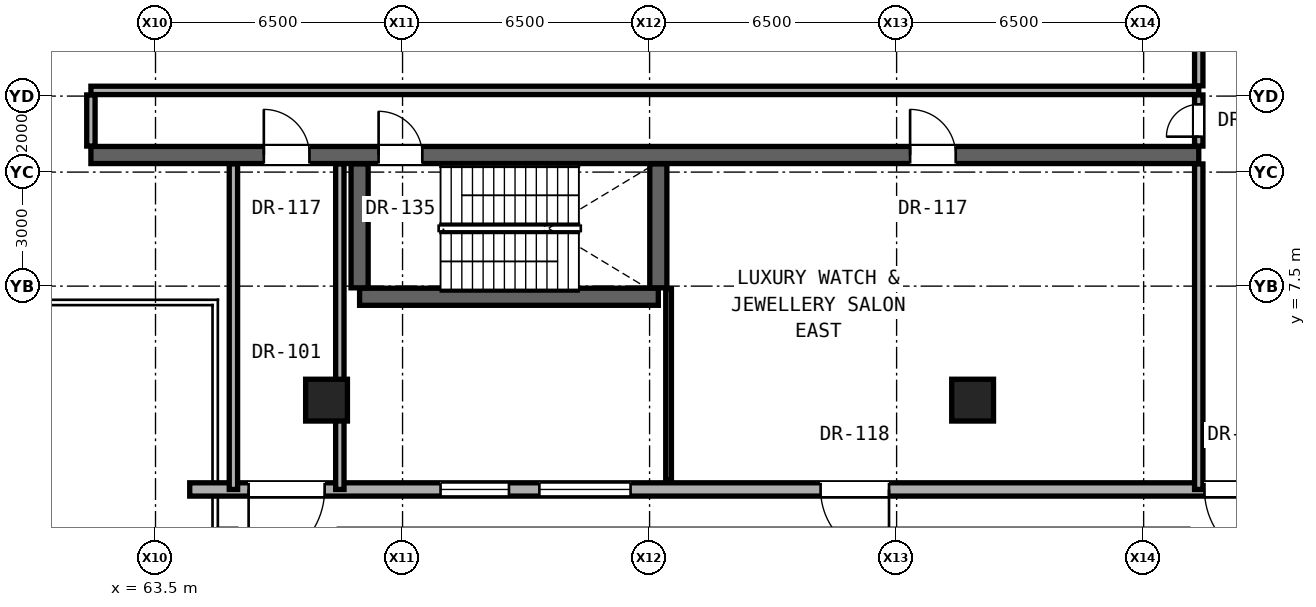
"""IFC4 building model, lengths in metres.
Left out: names, types, materials, properties, quantities, classifications, styles, units other than length and angle.
Written with IfcOpenShell. Run it as: python <this file> out.ifc"""

import sys

from ifc_helpers import new_model, si_unit, direction, frame, frame_2d, origin, origin_2d, place, context, subcontext, project, spatial, rectangle, extrude, element, fill, save


model = new_model("IFC4")
c1 = context("Model", 3, precision=1e-05, world=origin(), true_north=direction((0.0, 1.0)))
c2 = subcontext(c1, "Body", "Model", "MODEL_VIEW")
j1 = project(units=[si_unit("LENGTHUNIT", "METRE"), si_unit("PLANEANGLEUNIT", "RADIAN")], contexts=[c1])
p1 = place(None, origin())
s1 = spatial("IfcSite", under=j1, at=p1, CompositionType="ELEMENT")
p2 = place(p1, origin())
s2 = spatial("IfcBuilding", under=s1, at=p2, CompositionType="ELEMENT")
p3 = place(p2, origin())
s3 = spatial("IfcBuildingStorey", under=s2, at=p3, CompositionType="ELEMENT", Elevation=0.0)
for number, where, z_axis, x_axis in (
    (1, (68.0, 4.5, 0.0), (0.0, 0.0, 1.0), (1.0, 0.0, 0.0)),
    (2, (85.0, 4.5, 0.0), (0.0, 0.0, 1.0), (1.0, 0.0, 0.0)),
):
    element("IfcColumn", number, at=place(p3, frame(where, z_axis=z_axis, x_axis=x_axis)), inside=s3, PredefinedType="COLUMN", context=c2, shape_type="SweptSolid", body=[
        extrude(rectangle(XDim=1.1, YDim=1.1, at=origin_2d()), origin(), (0.0, 0.0, 1.0), 5.2),
    ])
p4 = place(p3, frame((93.8, 2.15, 0.0), z_axis=(0.0, 0.0, 1.0), x_axis=(-1.0, 0.0, 0.0)))
e3 = element("IfcWall", 3, at=p4, inside=s3, PredefinedType="SOLIDWALL", context=c2, shape_type="SweptSolid", body=[
    extrude(rectangle(XDim=29.4, YDim=0.35, at=frame_2d((14.7, 0.0))), origin(), (0.0, 0.0, 1.0), 4.86),
])
p5 = place(p4, frame((17.8, 0.0, 0.85)))
e4 = element("IfcOpeningElement", 4, at=p5, cuts=e3, PredefinedType="OPENING", context=c2, shape_type="SweptSolid", body=[
    extrude(rectangle(XDim=2.4, YDim=2.6, at=frame_2d((1.2, 1.3))), frame((0.0, 0.185, 0.0), z_axis=(0.0, -1.0, 0.0), x_axis=(1.0, 0.0, 0.0)), (0.0, 0.0, 1.0), 0.37),
])
p6 = place(p4, frame((21.0, 0.0, 0.85)))
e5 = element("IfcOpeningElement", 5, at=p6, cuts=e3, PredefinedType="OPENING", context=c2, shape_type="SweptSolid", body=[
    extrude(rectangle(XDim=1.8, YDim=2.4, at=frame_2d((0.9, 1.2))), frame((0.0, 0.185, 0.0), z_axis=(0.0, -1.0, 0.0), x_axis=(1.0, 0.0, 0.0)), (0.0, 0.0, 1.0), 0.37),
])
p7 = place(p4, frame((0.7, 0.0, 0.0)))
e6 = element("IfcOpeningElement", 6, at=p7, cuts=e3, PredefinedType="OPENING", context=c2, shape_type="SweptSolid", body=[
    extrude(rectangle(XDim=2.0, YDim=2.4, at=frame_2d((1.0, 1.2))), frame((0.0, 0.185, 0.0), z_axis=(0.0, -1.0, 0.0), x_axis=(1.0, 0.0, 0.0)), (0.0, 0.0, 1.0), 0.37),
])
p8 = place(p4, frame((11.0, 0.0, 0.0)))
e7 = element("IfcOpeningElement", 7, at=p8, cuts=e3, PredefinedType="OPENING", context=c2, shape_type="SweptSolid", body=[
    extrude(rectangle(XDim=1.8, YDim=2.5, at=frame_2d((0.9, 1.25))), frame((0.0, 0.185, 0.0), z_axis=(0.0, -1.0, 0.0), x_axis=(1.0, 0.0, 0.0)), (0.0, 0.0, 1.0), 0.37),
])
p9 = place(p4, frame((25.85, 0.0, 0.0)))
e8 = element("IfcOpeningElement", 8, at=p9, cuts=e3, PredefinedType="OPENING", context=c2, shape_type="SweptSolid", body=[
    extrude(rectangle(XDim=2.0, YDim=2.4, at=frame_2d((1.0, 1.2))), frame((0.0, 0.185, 0.0), z_axis=(0.0, -1.0, 0.0), x_axis=(1.0, 0.0, 0.0)), (0.0, 0.0, 1.0), 0.37),
])
p10 = place(p3, frame((68.87, 7.22, 0.0), z_axis=(0.0, 0.0, 1.0), x_axis=(1.0, 0.0, 0.0)))
e9 = element("IfcWall", 9, at=p10, inside=s3, PredefinedType="SHEAR", context=c2, shape_type="SweptSolid", body=[
    extrude(rectangle(XDim=7.86, YDim=0.45, at=frame_2d((3.93, 0.0))), origin(), (0.0, 0.0, 1.0), 4.88),
])
p11 = place(p3, frame((61.8, 10.95, 0.0), z_axis=(0.0, 0.0, 1.0), x_axis=(1.0, 0.0, 0.0)))
e10 = element("IfcWall", 10, at=p11, inside=s3, PredefinedType="SHEAR", context=c2, shape_type="SweptSolid", body=[
    extrude(rectangle(XDim=29.15, YDim=0.45, at=frame_2d((14.575, 0.0))), origin(), (0.0, 0.0, 1.0), 4.88),
])
p12 = place(p11, frame((4.55, 0.0, 0.0)))
e11 = element("IfcOpeningElement", 11, at=p12, cuts=e10, PredefinedType="OPENING", context=c2, shape_type="SweptSolid", body=[
    extrude(rectangle(XDim=1.2, YDim=2.25, at=frame_2d((0.6, 1.125))), frame((0.0, 0.235, 0.0), z_axis=(0.0, -1.0, 0.0), x_axis=(1.0, 0.0, 0.0)), (0.0, 0.0, 1.0), 0.47),
])
p13 = place(p11, frame((7.57, 0.0, 0.0)))
e12 = element("IfcOpeningElement", 12, at=p13, cuts=e10, PredefinedType="OPENING", context=c2, shape_type="SweptSolid", body=[
    extrude(rectangle(XDim=1.15, YDim=2.2, at=frame_2d((0.575, 1.1))), frame((0.0, 0.235, 0.0), z_axis=(0.0, -1.0, 0.0), x_axis=(1.0, 0.0, 0.0)), (0.0, 0.0, 1.0), 0.47),
])
p14 = place(p11, frame((21.555, 0.0, 0.0)))
e13 = element("IfcOpeningElement", 13, at=p14, cuts=e10, PredefinedType="OPENING", context=c2, shape_type="SweptSolid", body=[
    extrude(rectangle(XDim=1.2, YDim=2.25, at=frame_2d((0.6, 1.125))), frame((0.0, 0.235, 0.0), z_axis=(0.0, -1.0, 0.0), x_axis=(1.0, 0.0, 0.0)), (0.0, 0.0, 1.0), 0.47),
])
p15 = place(p3, frame((61.8, 12.65, 0.0), z_axis=(0.0, 0.0, 1.0), x_axis=(1.0, 0.0, 0.0)))
e14 = element("IfcWall", 14, at=p15, inside=s3, PredefinedType="SOLIDWALL", context=c2, shape_type="SweptSolid", body=[
    extrude(rectangle(XDim=29.15, YDim=0.22, at=frame_2d((14.575, 0.0))), origin(), (0.0, 0.0, 1.0), 4.016),
])
p16 = place(p3, frame((61.8, 11.185, 0.0), z_axis=(0.0, 0.0, 1.0), x_axis=(0.0, 1.0, 0.0)))
e15 = element("IfcWall", 15, at=p16, inside=s3, PredefinedType="SOLIDWALL", context=c2, shape_type="SweptSolid", body=[
    extrude(rectangle(XDim=1.345, YDim=0.22, at=frame_2d((0.672, 0.0))), origin(), (0.0, 0.0, 1.0), 4.88),
])
p17 = place(p3, frame((65.55, 2.15, 0.0), z_axis=(0.0, 0.0, 1.0), x_axis=(0.0, 1.0, 0.0)))
e16 = element("IfcWall", 16, at=p17, inside=s3, PredefinedType="SOLIDWALL", context=c2, shape_type="SweptSolid", body=[
    extrude(rectangle(XDim=8.565, YDim=0.22, at=frame_2d((4.283, 0.0))), origin(), (0.0, 0.0, 1.0), 4.099),
])
p18 = place(p3, frame((68.35, 2.15, 0.0), z_axis=(0.0, 0.0, 1.0), x_axis=(0.0, 1.0, 0.0)))
e17 = element("IfcWall", 17, at=p18, inside=s3, PredefinedType="SOLIDWALL", context=c2, shape_type="SweptSolid", body=[
    extrude(rectangle(XDim=8.565, YDim=0.22, at=frame_2d((4.283, 0.0))), origin(), (0.0, 0.0, 1.0), 4.016),
])
for number, where, z_axis, x_axis in (
    (18, (68.87, 7.455, 0.0), (0.0, 0.0, 1.0), (0.0, 1.0, 0.0)),
    (19, (76.73, 7.455, 0.0), (0.0, 0.0, 1.0), (0.0, 1.0, 0.0)),
):
    element("IfcWall", number, at=place(p3, frame(where, z_axis=z_axis, x_axis=x_axis)), inside=s3, PredefinedType="SHEAR", context=c2, shape_type="SweptSolid", body=[
        extrude(rectangle(XDim=3.26, YDim=0.45, at=frame_2d((1.63, 0.0))), origin(), (0.0, 0.0, 1.0), 4.88),
    ])
p19 = place(p3, frame((77.0, 2.4, 0.0), z_axis=(0.0, 0.0, 1.0), x_axis=(0.0, 1.0, 0.0)))
e20 = element("IfcWall", 20, at=p19, inside=s3, PredefinedType="PARTITIONING", context=c2, shape_type="SweptSolid", body=[
    extrude(rectangle(XDim=5.035, YDim=0.15, at=frame_2d((2.518, 0.0))), origin(), (0.0, 0.0, 1.0), 4.016),
])
p20 = place(p3, frame((90.95, 2.15, 0.0), z_axis=(0.0, 0.0, 1.0), x_axis=(0.0, 1.0, 0.0)))
e21 = element("IfcWall", 21, at=p20, inside=s3, PredefinedType="SOLIDWALL", context=c2, shape_type="SweptSolid", body=[
    extrude(rectangle(XDim=8.565, YDim=0.22, at=frame_2d((4.283, 0.0))), origin(), (0.0, 0.0, 1.0), 4.88),
])
p21 = place(p3, frame((90.95, 11.185, 0.0), z_axis=(0.0, 0.0, 1.0), x_axis=(0.0, 1.0, 0.0)))
e22 = element("IfcWall", 22, at=p21, inside=s3, PredefinedType="SOLIDWALL", context=c2, shape_type="SweptSolid", body=[
    extrude(rectangle(XDim=1.345, YDim=0.22, at=frame_2d((0.672, 0.0))), origin(), (0.0, 0.0, 1.0), 4.88),
])
p22 = place(p21, frame((0.248, 0.0, 0.0)))
e23 = element("IfcOpeningElement", 23, at=p22, cuts=e22, PredefinedType="OPENING", context=c2, shape_type="SweptSolid", body=[
    extrude(rectangle(XDim=0.85, YDim=2.01, at=frame_2d((0.425, 1.005))), frame((0.0, 0.12, 0.0), z_axis=(0.0, -1.0, 0.0), x_axis=(1.0, 0.0, 0.0)), (0.0, 0.0, 1.0), 0.24),
])
p23 = place(p3, frame((90.95, 12.77, 0.0), z_axis=(0.0, 0.0, 1.0), x_axis=(0.0, 1.0, 0.0)))
e24 = element("IfcWall", 24, at=p23, inside=s3, PredefinedType="SOLIDWALL", context=c2, shape_type="SweptSolid", body=[
    extrude(rectangle(XDim=7.91, YDim=0.22, at=frame_2d((3.955, 0.0))), origin(), (0.0, 0.0, 1.0), 4.016),
])
p24 = place(p5, origin())
e25 = element("IfcWindow", 25, at=p24, inside=s3, PartitioningType="SINGLE_PANEL", PredefinedType="WINDOW", context=c2, shape_type="SweptSolid", body=[
    extrude(rectangle(XDim=2.4, YDim=2.6, at=frame_2d((1.2, 1.3))), frame((0.0, 0.03, 0.0), z_axis=(0.0, -1.0, 0.0), x_axis=(1.0, 0.0, 0.0)), (0.0, 0.0, 1.0), 0.06),
])
fill(e4, e25)
p25 = place(p6, origin())
e26 = element("IfcWindow", 26, at=p25, inside=s3, PartitioningType="SINGLE_PANEL", PredefinedType="WINDOW", context=c2, shape_type="SweptSolid", body=[
    extrude(rectangle(XDim=1.8, YDim=2.4, at=frame_2d((0.9, 1.2))), frame((0.0, 0.03, 0.0), z_axis=(0.0, -1.0, 0.0), x_axis=(1.0, 0.0, 0.0)), (0.0, 0.0, 1.0), 0.06),
])
fill(e5, e26)
p26 = place(p7, origin())
e27 = element("IfcDoor", 27, at=p26, inside=s3, OperationType="SINGLE_SWING_LEFT", PredefinedType="DOOR", context=c2, shape_type="SweptSolid", body=[
    extrude(rectangle(XDim=2.0, YDim=2.4, at=frame_2d((1.0, 1.2))), frame((0.0, 0.025, 0.0), z_axis=(0.0, -1.0, 0.0), x_axis=(1.0, 0.0, 0.0)), (0.0, 0.0, 1.0), 0.05),
])
fill(e6, e27)
p27 = place(p8, origin())
e28 = element("IfcDoor", 28, at=p27, inside=s3, OperationType="SINGLE_SWING_LEFT", PredefinedType="DOOR", context=c2, shape_type="SweptSolid", body=[
    extrude(rectangle(XDim=1.8, YDim=2.5, at=frame_2d((0.9, 1.25))), frame((0.0, 0.025, 0.0), z_axis=(0.0, -1.0, 0.0), x_axis=(1.0, 0.0, 0.0)), (0.0, 0.0, 1.0), 0.05),
])
fill(e7, e28)
p28 = place(p9, origin())
e29 = element("IfcDoor", 29, at=p28, inside=s3, OperationType="SINGLE_SWING_RIGHT", PredefinedType="DOOR", context=c2, shape_type="SweptSolid", body=[
    extrude(rectangle(XDim=2.0, YDim=2.4, at=frame_2d((1.0, 1.2))), frame((0.0, 0.025, 0.0), z_axis=(0.0, -1.0, 0.0), x_axis=(1.0, 0.0, 0.0)), (0.0, 0.0, 1.0), 0.05),
])
fill(e8, e29)
p29 = place(p22, origin())
e30 = element("IfcDoor", 30, at=p29, inside=s3, OperationType="SINGLE_SWING_LEFT", PredefinedType="DOOR", context=c2, shape_type="SweptSolid", body=[
    extrude(rectangle(XDim=0.85, YDim=2.01, at=frame_2d((0.425, 1.005))), frame((0.0, 0.025, 0.0), z_axis=(0.0, -1.0, 0.0), x_axis=(1.0, 0.0, 0.0)), (0.0, 0.0, 1.0), 0.05),
])
fill(e23, e30)
p30 = place(p12, origin())
e31 = element("IfcDoor", 31, at=p30, inside=s3, OperationType="SINGLE_SWING_LEFT", PredefinedType="DOOR", context=c2, shape_type="SweptSolid", body=[
    extrude(rectangle(XDim=1.2, YDim=2.25, at=frame_2d((0.6, 1.125))), frame((0.0, 0.025, 0.0), z_axis=(0.0, -1.0, 0.0), x_axis=(1.0, 0.0, 0.0)), (0.0, 0.0, 1.0), 0.05),
])
fill(e11, e31)
p31 = place(p13, origin())
e32 = element("IfcDoor", 32, at=p31, inside=s3, OperationType="SINGLE_SWING_LEFT", PredefinedType="DOOR", context=c2, shape_type="SweptSolid", body=[
    extrude(rectangle(XDim=1.15, YDim=2.2, at=frame_2d((0.575, 1.1))), frame((0.0, 0.025, 0.0), z_axis=(0.0, -1.0, 0.0), x_axis=(1.0, 0.0, 0.0)), (0.0, 0.0, 1.0), 0.05),
])
fill(e12, e32)
p32 = place(p14, origin())
e33 = element("IfcDoor", 33, at=p32, inside=s3, OperationType="SINGLE_SWING_LEFT", PredefinedType="DOOR", context=c2, shape_type="SweptSolid", body=[
    extrude(rectangle(XDim=1.2, YDim=2.25, at=frame_2d((0.6, 1.125))), frame((0.0, 0.025, 0.0), z_axis=(0.0, -1.0, 0.0), x_axis=(1.0, 0.0, 0.0)), (0.0, 0.0, 1.0), 0.05),
])
fill(e13, e33)
save(model, sys.argv[1])
